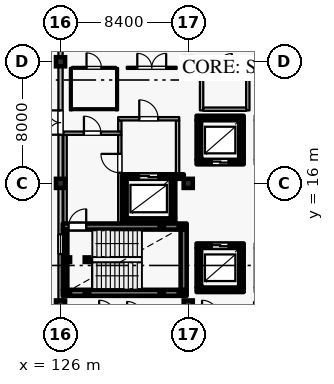
"""IFC4 building model, lengths in metres.
Left out: names, types, materials, properties, quantities, classifications, styles, units other than length and angle.
Written with IfcOpenShell. Run it as: python <this file> out.ifc"""

import sys

from ifc_helpers import new_model, si_unit, direction, frame, frame_2d, origin, origin_2d, place, context, subcontext, project, spatial, rectangle, hollow_rectangle, extrude, element, fill, save


model = new_model("IFC4")
c1 = context("Model", 3, precision=1e-05, world=origin(), true_north=direction((0.0, 1.0)))
c2 = subcontext(c1, "Body", "Model", "MODEL_VIEW")
j1 = project(units=[si_unit("LENGTHUNIT", "METRE"), si_unit("PLANEANGLEUNIT", "RADIAN")], contexts=[c1])
p1 = place(None, origin())
s1 = spatial("IfcSite", under=j1, at=p1, CompositionType="ELEMENT")
p2 = place(p1, origin())
s2 = spatial("IfcBuilding", under=s1, at=p2, CompositionType="ELEMENT")
p3 = place(p2, frame((0.0, 0.0, 43.2)))
s3 = spatial("IfcBuildingStorey", under=s2, at=p3, CompositionType="ELEMENT", Elevation=43.2)
for number, where, z_axis, x_axis in (
    (1, (126.0, 16.0, 0.0), (0.0, 0.0, 1.0), (1.0, 0.0, 0.0)),
    (2, (134.4, 16.0, 0.0), (0.0, 0.0, 1.0), (1.0, 0.0, 0.0)),
    (3, (126.0, 8.0, 0.0), (0.0, 0.0, 1.0), (1.0, 0.0, 0.0)),
    (4, (126.0, 24.0, 0.0), (0.0, 0.0, 1.0), (1.0, 0.0, 0.0)),
    (5, (134.4, 8.0, 0.0), (0.0, 0.0, 1.0), (1.0, 0.0, 0.0)),
    (6, (134.4, 24.0, 0.0), (0.0, 0.0, 1.0), (1.0, 0.0, 0.0)),
):
    element("IfcColumn", number, at=place(p3, frame(where, z_axis=z_axis, x_axis=x_axis)), inside=s3, PredefinedType="COLUMN", context=c2, shape_type="SweptSolid", body=[
        extrude(rectangle(XDim=0.6, YDim=0.6, at=origin_2d()), origin(), (0.0, 0.0, 1.0), 4.2),
    ])
p4 = place(p3, frame((126.0, 8.3, 0.0), z_axis=(0.0, 0.0, 1.0), x_axis=(0.0, 1.0, 0.0)))
e7 = element("IfcWall", 7, at=p4, inside=s3, PredefinedType="SOLIDWALL", context=c2, shape_type="SweptSolid", body=[
    extrude(rectangle(XDim=7.4, YDim=0.28, at=frame_2d((3.7, 0.0))), origin(), (0.0, 0.0, 1.0), 3.3),
])
p5 = place(p4, frame((3.05, 0.0, 0.75)))
e8 = element("IfcOpeningElement", 8, at=p5, cuts=e7, PredefinedType="OPENING", context=c2, shape_type="SweptSolid", body=[
    extrude(rectangle(XDim=1.3, YDim=1.65, at=frame_2d((0.65, 0.825))), frame((0.0, 0.15, 0.0), z_axis=(0.0, -1.0, 0.0), x_axis=(1.0, 0.0, 0.0)), (0.0, 0.0, 1.0), 0.3),
])
p6 = place(p3, frame((126.0, 16.3, 0.0), z_axis=(0.0, 0.0, 1.0), x_axis=(0.0, 1.0, 0.0)))
e9 = element("IfcWall", 9, at=p6, inside=s3, PredefinedType="SOLIDWALL", context=c2, shape_type="SweptSolid", body=[
    extrude(rectangle(XDim=7.4, YDim=0.28, at=frame_2d((3.7, 0.0))), origin(), (0.0, 0.0, 1.0), 3.3),
])
p7 = place(p6, frame((2.9, 0.0, 0.0)))
e10 = element("IfcOpeningElement", 10, at=p7, cuts=e9, PredefinedType="OPENING", context=c2, shape_type="SweptSolid", body=[
    extrude(rectangle(XDim=1.6, YDim=2.25, at=frame_2d((0.8, 1.125))), frame((0.0, 0.15, 0.0), z_axis=(0.0, -1.0, 0.0), x_axis=(1.0, 0.0, 0.0)), (0.0, 0.0, 1.0), 0.3),
])
p8 = place(p3, frame((126.0, 24.3, 0.0), z_axis=(0.0, 0.0, 1.0), x_axis=(0.0, 1.0, 0.0)))
e11 = element("IfcWall", 11, at=p8, inside=s3, PredefinedType="SOLIDWALL", context=c2, shape_type="SweptSolid", body=[
    extrude(rectangle(XDim=7.4, YDim=0.28, at=frame_2d((3.7, 0.0))), origin(), (0.0, 0.0, 1.0), 3.3),
])
p9 = place(p8, frame((3.05, 0.0, 0.75)))
e12 = element("IfcOpeningElement", 12, at=p9, cuts=e11, PredefinedType="OPENING", context=c2, shape_type="SweptSolid", body=[
    extrude(rectangle(XDim=1.3, YDim=1.65, at=frame_2d((0.65, 0.825))), frame((0.0, 0.15, 0.0), z_axis=(0.0, -1.0, 0.0), x_axis=(1.0, 0.0, 0.0)), (0.0, 0.0, 1.0), 0.3),
])
p10 = place(p3, frame((134.95, 17.4, 0.0), z_axis=(0.0, 0.0, 1.0), x_axis=(1.0, 0.0, 0.0)))
e13 = element("IfcWall", 13, at=p10, inside=s3, PredefinedType="SHEAR", context=c2, shape_type="SweptSolid", body=[
    extrude(rectangle(XDim=3.1, YDim=0.3, at=frame_2d((1.55, 0.0))), origin(), (0.0, 0.0, 1.0), 3.935),
])
p11 = place(p10, frame((1.0, 0.0, 0.0)))
e14 = element("IfcOpeningElement", 14, at=p11, cuts=e13, PredefinedType="OPENING", context=c2, shape_type="SweptSolid", body=[
    extrude(rectangle(XDim=1.1, YDim=2.2, at=frame_2d((0.55, 1.1))), frame((0.0, 0.16, 0.0), z_axis=(0.0, -1.0, 0.0), x_axis=(1.0, 0.0, 0.0)), (0.0, 0.0, 1.0), 0.32),
])
p12 = place(p3, frame((137.9, 17.555, 0.0), z_axis=(0.0, 0.0, 1.0), x_axis=(0.0, 1.0, 0.0)))
e15 = element("IfcWall", 15, at=p12, inside=s3, PredefinedType="SHEAR", context=c2, shape_type="SweptSolid", body=[
    extrude(rectangle(XDim=2.59, YDim=0.3, at=frame_2d((1.295, 0.0))), origin(), (0.0, 0.0, 1.0), 3.935),
])
p13 = place(p3, frame((138.05, 20.3, 0.0), z_axis=(0.0, 0.0, 1.0), x_axis=(-1.0, 0.0, 0.0)))
e16 = element("IfcWall", 16, at=p13, inside=s3, PredefinedType="SHEAR", context=c2, shape_type="SweptSolid", body=[
    extrude(rectangle(XDim=3.1, YDim=0.3, at=frame_2d((1.55, 0.0))), origin(), (0.0, 0.0, 1.0), 3.935),
])
p14 = place(p3, frame((135.1, 20.145, 0.0), z_axis=(0.0, 0.0, 1.0), x_axis=(0.0, -1.0, 0.0)))
e17 = element("IfcWall", 17, at=p14, inside=s3, PredefinedType="SHEAR", context=c2, shape_type="SweptSolid", body=[
    extrude(rectangle(XDim=2.59, YDim=0.3, at=frame_2d((1.295, 0.0))), origin(), (0.0, 0.0, 1.0), 3.935),
])
p15 = place(p3, frame((134.95, 9.0, 0.0), z_axis=(0.0, 0.0, 1.0), x_axis=(1.0, 0.0, 0.0)))
e18 = element("IfcWall", 18, at=p15, inside=s3, PredefinedType="SHEAR", context=c2, shape_type="SweptSolid", body=[
    extrude(rectangle(XDim=3.1, YDim=0.3, at=frame_2d((1.55, 0.0))), origin(), (0.0, 0.0, 1.0), 3.935),
])
p16 = place(p3, frame((137.9, 9.155, 0.0), z_axis=(0.0, 0.0, 1.0), x_axis=(0.0, 1.0, 0.0)))
e19 = element("IfcWall", 19, at=p16, inside=s3, PredefinedType="SHEAR", context=c2, shape_type="SweptSolid", body=[
    extrude(rectangle(XDim=2.59, YDim=0.3, at=frame_2d((1.295, 0.0))), origin(), (0.0, 0.0, 1.0), 3.935),
])
p17 = place(p3, frame((138.05, 11.9, 0.0), z_axis=(0.0, 0.0, 1.0), x_axis=(-1.0, 0.0, 0.0)))
e20 = element("IfcWall", 20, at=p17, inside=s3, PredefinedType="SHEAR", context=c2, shape_type="SweptSolid", body=[
    extrude(rectangle(XDim=3.1, YDim=0.3, at=frame_2d((1.55, 0.0))), origin(), (0.0, 0.0, 1.0), 3.935),
])
p18 = place(p17, frame((1.0, 0.0, 0.0)))
e21 = element("IfcOpeningElement", 21, at=p18, cuts=e20, PredefinedType="OPENING", context=c2, shape_type="SweptSolid", body=[
    extrude(rectangle(XDim=1.1, YDim=2.2, at=frame_2d((0.55, 1.1))), frame((0.0, 0.16, 0.0), z_axis=(0.0, -1.0, 0.0), x_axis=(1.0, 0.0, 0.0)), (0.0, 0.0, 1.0), 0.32),
])
p19 = place(p3, frame((135.1, 11.745, 0.0), z_axis=(0.0, 0.0, 1.0), x_axis=(0.0, -1.0, 0.0)))
e22 = element("IfcWall", 22, at=p19, inside=s3, PredefinedType="SHEAR", context=c2, shape_type="SweptSolid", body=[
    extrude(rectangle(XDim=2.59, YDim=0.3, at=frame_2d((1.295, 0.0))), origin(), (0.0, 0.0, 1.0), 3.935),
])
p20 = place(p3, frame((130.05, 13.55, 0.0), z_axis=(0.0, 0.0, 1.0), x_axis=(1.0, 0.0, 0.0)))
e23 = element("IfcWall", 23, at=p20, inside=s3, PredefinedType="SHEAR", context=c2, shape_type="SweptSolid", body=[
    extrude(rectangle(XDim=3.5, YDim=0.3, at=frame_2d((1.75, 0.0))), origin(), (0.0, 0.0, 1.0), 3.935),
])
p21 = place(p3, frame((133.4, 13.705, 0.0), z_axis=(0.0, 0.0, 1.0), x_axis=(0.0, 1.0, 0.0)))
e24 = element("IfcWall", 24, at=p21, inside=s3, PredefinedType="SHEAR", context=c2, shape_type="SweptSolid", body=[
    extrude(rectangle(XDim=2.59, YDim=0.3, at=frame_2d((1.295, 0.0))), origin(), (0.0, 0.0, 1.0), 3.935),
])
p22 = place(p3, frame((134.11, 16.45, 0.0), z_axis=(0.0, 0.0, 1.0), x_axis=(-1.0, 0.0, 0.0)))
e25 = element("IfcWall", 25, at=p22, inside=s3, PredefinedType="SHEAR", context=c2, shape_type="SweptSolid", body=[
    extrude(rectangle(XDim=4.06, YDim=0.3, at=frame_2d((2.03, 0.0))), origin(), (0.0, 0.0, 1.0), 3.935),
])
p23 = place(p22, frame((1.685, 0.0, 0.0)))
e26 = element("IfcOpeningElement", 26, at=p23, cuts=e25, PredefinedType="OPENING", context=c2, shape_type="SweptSolid", body=[
    extrude(rectangle(XDim=1.25, YDim=2.25, at=frame_2d((0.625, 1.125))), frame((0.0, 0.16, 0.0), z_axis=(0.0, -1.0, 0.0), x_axis=(1.0, 0.0, 0.0)), (0.0, 0.0, 1.0), 0.32),
])
p24 = place(p3, frame((130.2, 16.295, 0.0), z_axis=(0.0, 0.0, 1.0), x_axis=(0.0, -1.0, 0.0)))
e27 = element("IfcWall", 27, at=p24, inside=s3, PredefinedType="SHEAR", context=c2, shape_type="SweptSolid", body=[
    extrude(rectangle(XDim=2.59, YDim=0.3, at=frame_2d((1.295, 0.0))), origin(), (0.0, 0.0, 1.0), 3.935),
])
p25 = place(p3, frame((126.15, 8.8, 0.0), z_axis=(0.0, 0.0, 1.0), x_axis=(1.0, 0.0, 0.0)))
e28 = element("IfcWall", 28, at=p25, inside=s3, PredefinedType="SHEAR", context=c2, shape_type="SweptSolid", body=[
    extrude(rectangle(XDim=8.15, YDim=0.4, at=frame_2d((4.075, 0.0))), origin(), (0.0, 0.0, 1.0), 3.935),
])
p26 = place(p3, frame((134.1, 9.005, 0.0), z_axis=(0.0, 0.0, 1.0), x_axis=(0.0, 1.0, 0.0)))
e29 = element("IfcWall", 29, at=p26, inside=s3, PredefinedType="SHEAR", context=c2, shape_type="SweptSolid", body=[
    extrude(rectangle(XDim=3.95, YDim=0.4, at=frame_2d((1.975, 0.0))), origin(), (0.0, 0.0, 1.0), 3.935),
])
p27 = place(p3, frame((126.15, 13.16, 0.0), z_axis=(0.0, 0.0, 1.0), x_axis=(1.0, 0.0, 0.0)))
e30 = element("IfcWall", 30, at=p27, inside=s3, PredefinedType="SHEAR", context=c2, shape_type="SweptSolid", body=[
    extrude(rectangle(XDim=8.15, YDim=0.4, at=frame_2d((4.075, 0.0))), origin(), (0.0, 0.0, 1.0), 3.935),
])
p28 = place(p27, frame((0.38, 0.0, 0.0)))
e31 = element("IfcOpeningElement", 31, at=p28, cuts=e30, PredefinedType="OPENING", context=c2, shape_type="SweptSolid", body=[
    extrude(rectangle(XDim=1.16, YDim=2.2, at=frame_2d((0.58, 1.1))), frame((0.0, 0.21, 0.0), z_axis=(0.0, -1.0, 0.0), x_axis=(1.0, 0.0, 0.0)), (0.0, 0.0, 1.0), 0.42),
])
p29 = place(p3, frame((126.3, 9.005, 0.0), z_axis=(0.0, 0.0, 1.0), x_axis=(0.0, 1.0, 0.0)))
e32 = element("IfcWall", 32, at=p29, inside=s3, PredefinedType="SHEAR", context=c2, shape_type="SweptSolid", body=[
    extrude(rectangle(XDim=3.95, YDim=0.3, at=frame_2d((1.975, 0.0))), origin(), (0.0, 0.0, 1.0), 3.935),
])
p30 = place(p3, frame((126.3, 13.365, 0.0), z_axis=(0.0, 0.0, 1.0), x_axis=(0.0, 1.0, 0.0)))
e33 = element("IfcWall", 33, at=p30, inside=s3, PredefinedType="PARTITIONING", context=c2, shape_type="SweptSolid", body=[
    extrude(rectangle(XDim=5.82, YDim=0.22, at=frame_2d((2.91, 0.0))), origin(), (0.0, 0.0, 1.0), 3.935),
])
p31 = place(p3, frame((126.19, 19.3, 0.0), z_axis=(0.0, 0.0, 1.0), x_axis=(1.0, 0.0, 0.0)))
e34 = element("IfcWall", 34, at=p31, inside=s3, PredefinedType="PARTITIONING", context=c2, shape_type="SweptSolid", body=[
    extrude(rectangle(XDim=3.82, YDim=0.22, at=frame_2d((1.91, 0.0))), origin(), (0.0, 0.0, 1.0), 3.935),
])
p32 = place(p31, frame((1.35, 0.0, 0.0)))
e35 = element("IfcOpeningElement", 35, at=p32, cuts=e34, PredefinedType="OPENING", context=c2, shape_type="SweptSolid", body=[
    extrude(rectangle(XDim=1.12, YDim=2.2, at=frame_2d((0.56, 1.1))), frame((0.0, 0.12, 0.0), z_axis=(0.0, -1.0, 0.0), x_axis=(1.0, 0.0, 0.0)), (0.0, 0.0, 1.0), 0.24),
])
p33 = place(p3, frame((129.9, 13.365, 0.0), z_axis=(0.0, 0.0, 1.0), x_axis=(0.0, 1.0, 0.0)))
e36 = element("IfcWall", 36, at=p33, inside=s3, PredefinedType="PARTITIONING", context=c2, shape_type="SweptSolid", body=[
    extrude(rectangle(XDim=5.82, YDim=0.22, at=frame_2d((2.91, 0.0))), origin(), (0.0, 0.0, 1.0), 3.935),
])
p34 = place(p33, frame((3.335, 0.0, 0.0)))
e37 = element("IfcOpeningElement", 37, at=p34, cuts=e36, PredefinedType="OPENING", context=c2, shape_type="SweptSolid", body=[
    extrude(rectangle(XDim=1.24, YDim=2.2, at=frame_2d((0.62, 1.1))), frame((0.0, 0.12, 0.0), z_axis=(0.0, -1.0, 0.0), x_axis=(1.0, 0.0, 0.0)), (0.0, 0.0, 1.0), 0.24),
])
p35 = place(p3, frame((129.9, 19.415, 0.0), z_axis=(0.0, 0.0, 1.0), x_axis=(0.0, 1.0, 0.0)))
e38 = element("IfcWall", 38, at=p35, inside=s3, PredefinedType="PARTITIONING", context=c2, shape_type="SweptSolid", body=[
    extrude(rectangle(XDim=0.72, YDim=0.22, at=frame_2d((0.36, 0.0))), origin(), (0.0, 0.0, 1.0), 3.935),
])
p36 = place(p3, frame((133.7, 16.605, 0.0), z_axis=(0.0, 0.0, 1.0), x_axis=(0.0, 1.0, 0.0)))
e39 = element("IfcWall", 39, at=p36, inside=s3, PredefinedType="PARTITIONING", context=c2, shape_type="SweptSolid", body=[
    extrude(rectangle(XDim=3.53, YDim=0.22, at=frame_2d((1.765, 0.0))), origin(), (0.0, 0.0, 1.0), 3.935),
])
p37 = place(p3, frame((129.79, 20.25, 0.0), z_axis=(0.0, 0.0, 1.0), x_axis=(1.0, 0.0, 0.0)))
e40 = element("IfcWall", 40, at=p37, inside=s3, PredefinedType="PARTITIONING", context=c2, shape_type="SweptSolid", body=[
    extrude(rectangle(XDim=4.02, YDim=0.22, at=frame_2d((2.01, 0.0))), origin(), (0.0, 0.0, 1.0), 3.935),
])
p38 = place(p37, frame((1.39, 0.0, 0.0)))
e41 = element("IfcOpeningElement", 41, at=p38, cuts=e40, PredefinedType="OPENING", context=c2, shape_type="SweptSolid", body=[
    extrude(rectangle(XDim=1.24, YDim=2.2, at=frame_2d((0.62, 1.1))), frame((0.0, 0.12, 0.0), z_axis=(0.0, -1.0, 0.0), x_axis=(1.0, 0.0, 0.0)), (0.0, 0.0, 1.0), 0.24),
])
for number, where, z_axis, x_axis in (
    (42, (126.48, 8.8, 0.0), (0.0, 0.0, 1.0), (1.0, 0.0, 0.0)),
    (43, (126.48, 10.98, 0.0), (0.0, 0.0, 1.0), (1.0, 0.0, 0.0)),
    (44, (127.74, 8.8, 0.0), (0.0, 0.0, 1.0), (1.0, 0.0, 0.0)),
    (45, (127.74, 10.98, 0.0), (0.0, 0.0, 1.0), (1.0, 0.0, 0.0)),
):
    element("IfcColumn", number, at=place(p3, frame(where, z_axis=z_axis, x_axis=x_axis)), inside=s3, PredefinedType="COLUMN", context=c2, shape_type="SweptSolid", body=[
        extrude(hollow_rectangle(XDim=0.3, YDim=0.3, WallThickness=0.012, at=origin_2d()), origin(), (0.0, 0.0, 1.0), 4.02),
    ])
for number, where, z_axis, x_axis in (
    (46, (132.66, 8.8, -1.8), (0.0, 0.0, 1.0), (1.0, 0.0, 0.0)),
    (47, (132.66, 13.16, -1.8), (0.0, 0.0, 1.0), (1.0, 0.0, 0.0)),
    (48, (133.92, 8.8, -1.8), (0.0, 0.0, 1.0), (1.0, 0.0, 0.0)),
    (49, (133.92, 13.16, -1.8), (0.0, 0.0, 1.0), (1.0, 0.0, 0.0)),
):
    element("IfcColumn", number, at=place(p3, frame(where, z_axis=z_axis, x_axis=x_axis)), inside=s3, PredefinedType="COLUMN", context=c2, shape_type="SweptSolid", body=[
        extrude(hollow_rectangle(XDim=0.3, YDim=0.3, WallThickness=0.012, at=origin_2d()), origin(), (0.0, 0.0, 1.0), 3.72),
    ])
p39 = place(p3, frame((130.36, 23.6, 0.0), z_axis=(0.0, 0.0, 1.0), x_axis=(1.0, 0.0, 0.0)))
e50 = element("IfcWall", 50, at=p39, inside=s3, PredefinedType="PARTITIONING", context=c2, shape_type="SweptSolid", body=[
    extrude(rectangle(XDim=3.28, YDim=0.14, at=frame_2d((1.64, 0.0))), origin(), (0.0, 0.0, 1.0), 3.935),
])
p40 = place(p39, frame((0.69, 0.0, 0.0)))
e51 = element("IfcOpeningElement", 51, at=p40, cuts=e50, PredefinedType="OPENING", context=c2, shape_type="SweptSolid", body=[
    extrude(rectangle(XDim=1.9, YDim=2.4, at=frame_2d((0.95, 1.2))), frame((0.0, 0.08, 0.0), z_axis=(0.0, -1.0, 0.0), x_axis=(1.0, 0.0, 0.0)), (0.0, 0.0, 1.0), 0.16),
])
p41 = place(p3, frame((135.36, 23.6, 0.0), z_axis=(0.0, 0.0, 1.0), x_axis=(1.0, 0.0, 0.0)))
e52 = element("IfcWall", 52, at=p41, inside=s3, PredefinedType="PARTITIONING", context=c2, shape_type="SweptSolid", body=[
    extrude(rectangle(XDim=2.88, YDim=0.22, at=frame_2d((1.44, 0.0))), origin(), (0.0, 0.0, 1.0), 3.935),
])
p42 = place(p41, frame((0.97, 0.0, 0.0)))
e53 = element("IfcOpeningElement", 53, at=p42, cuts=e52, PredefinedType="OPENING", context=c2, shape_type="SweptSolid", body=[
    extrude(rectangle(XDim=0.94, YDim=2.15, at=frame_2d((0.47, 1.075))), frame((0.0, 0.12, 0.0), z_axis=(0.0, -1.0, 0.0), x_axis=(1.0, 0.0, 0.0)), (0.0, 0.0, 1.0), 0.24),
])
p43 = place(p3, frame((126.76, 23.6, 0.0), z_axis=(0.0, 0.0, 1.0), x_axis=(1.0, 0.0, 0.0)))
e54 = element("IfcWall", 54, at=p43, inside=s3, PredefinedType="PARTITIONING", context=c2, shape_type="SweptSolid", body=[
    extrude(rectangle(XDim=2.88, YDim=0.125, at=frame_2d((1.44, 0.0))), origin(), (0.0, 0.0, 1.0), 3.935),
])
p44 = place(p43, frame((0.95, 0.0, 0.0)))
e55 = element("IfcOpeningElement", 55, at=p44, cuts=e54, PredefinedType="OPENING", context=c2, shape_type="SweptSolid", body=[
    extrude(rectangle(XDim=0.98, YDim=2.15, at=frame_2d((0.49, 1.075))), frame((0.0, 0.073, 0.0), z_axis=(0.0, -1.0, 0.0), x_axis=(1.0, 0.0, 0.0)), (0.0, 0.0, 1.0), 0.145),
])
for number, where, z_axis, x_axis in (
    (56, (135.28, 20.8, 0.0), (0.0, 0.0, 1.0), (0.0, 1.0, 0.0)),
    (57, (138.32, 20.8, 0.0), (0.0, 0.0, 1.0), (0.0, 1.0, 0.0)),
):
    element("IfcWall", number, at=place(p3, frame(where, z_axis=z_axis, x_axis=x_axis)), inside=s3, PredefinedType="PARTITIONING", context=c2, shape_type="SweptSolid", body=[
        extrude(rectangle(XDim=2.748, YDim=0.22, at=frame_2d((1.374, 0.0))), origin(), (0.0, 0.0, 1.0), 3.935),
    ])
p45 = place(p3, frame((135.39, 20.88, 0.0), z_axis=(0.0, 0.0, 1.0), x_axis=(1.0, 0.0, 0.0)))
e58 = element("IfcWall", 58, at=p45, inside=s3, PredefinedType="PARTITIONING", context=c2, shape_type="SweptSolid", body=[
    extrude(rectangle(XDim=2.82, YDim=0.22, at=frame_2d((1.41, 0.0))), origin(), (0.0, 0.0, 1.0), 3.935),
])
for number, where, z_axis, x_axis in (
    (59, (126.68, 20.8, 0.0), (0.0, 0.0, 1.0), (0.0, 1.0, 0.0)),
    (60, (129.72, 20.8, 0.0), (0.0, 0.0, 1.0), (0.0, 1.0, 0.0)),
):
    element("IfcWall", number, at=place(p3, frame(where, z_axis=z_axis, x_axis=x_axis)), inside=s3, PredefinedType="PARTITIONING", context=c2, shape_type="SweptSolid", body=[
        extrude(rectangle(XDim=2.796, YDim=0.125, at=frame_2d((1.398, 0.0))), origin(), (0.0, 0.0, 1.0), 3.935),
    ])
p46 = place(p3, frame((126.742, 20.88, 0.0), z_axis=(0.0, 0.0, 1.0), x_axis=(1.0, 0.0, 0.0)))
e61 = element("IfcWall", 61, at=p46, inside=s3, PredefinedType="PARTITIONING", context=c2, shape_type="SweptSolid", body=[
    extrude(rectangle(XDim=2.915, YDim=0.125, at=frame_2d((1.458, 0.0))), origin(), (0.0, 0.0, 1.0), 3.935),
])
p47 = place(p5, origin())
e62 = element("IfcWindow", 62, at=p47, inside=s3, PartitioningType="SINGLE_PANEL", PredefinedType="WINDOW", context=c2, shape_type="SweptSolid", body=[
    extrude(rectangle(XDim=1.3, YDim=1.65, at=frame_2d((0.65, 0.825))), frame((0.0, 0.03, 0.0), z_axis=(0.0, -1.0, 0.0), x_axis=(1.0, 0.0, 0.0)), (0.0, 0.0, 1.0), 0.06),
])
fill(e8, e62)
p48 = place(p7, origin())
e63 = element("IfcDoor", 63, at=p48, inside=s3, OperationType="DOUBLE_DOOR_SINGLE_SWING", PredefinedType="DOOR", context=c2, shape_type="SweptSolid", body=[
    extrude(rectangle(XDim=1.6, YDim=2.25, at=frame_2d((0.8, 1.125))), frame((0.0, 0.025, 0.0), z_axis=(0.0, -1.0, 0.0), x_axis=(1.0, 0.0, 0.0)), (0.0, 0.0, 1.0), 0.05),
])
fill(e10, e63)
p49 = place(p11, origin())
e64 = element("IfcDoor", 64, at=p49, inside=s3, OperationType="DOUBLE_DOOR_SLIDING", PredefinedType="DOOR", context=c2, shape_type="SweptSolid", body=[
    extrude(rectangle(XDim=1.1, YDim=2.2, at=frame_2d((0.55, 1.1))), frame((0.0, 0.025, 0.0), z_axis=(0.0, -1.0, 0.0), x_axis=(1.0, 0.0, 0.0)), (0.0, 0.0, 1.0), 0.05),
])
fill(e14, e64)
p50 = place(p18, origin())
e65 = element("IfcDoor", 65, at=p50, inside=s3, OperationType="DOUBLE_DOOR_SLIDING", PredefinedType="DOOR", context=c2, shape_type="SweptSolid", body=[
    extrude(rectangle(XDim=1.1, YDim=2.2, at=frame_2d((0.55, 1.1))), frame((0.0, 0.025, 0.0), z_axis=(0.0, -1.0, 0.0), x_axis=(1.0, 0.0, 0.0)), (0.0, 0.0, 1.0), 0.05),
])
fill(e21, e65)
p51 = place(p23, origin())
e66 = element("IfcDoor", 66, at=p51, inside=s3, OperationType="DOUBLE_DOOR_SLIDING", PredefinedType="DOOR", context=c2, shape_type="SweptSolid", body=[
    extrude(rectangle(XDim=1.25, YDim=2.25, at=frame_2d((0.625, 1.125))), frame((0.0, 0.025, 0.0), z_axis=(0.0, -1.0, 0.0), x_axis=(1.0, 0.0, 0.0)), (0.0, 0.0, 1.0), 0.05),
])
fill(e26, e66)
p52 = place(p28, origin())
e67 = element("IfcDoor", 67, at=p52, inside=s3, OperationType="SINGLE_SWING_RIGHT", PredefinedType="DOOR", context=c2, shape_type="SweptSolid", body=[
    extrude(rectangle(XDim=1.16, YDim=2.2, at=frame_2d((0.58, 1.1))), frame((0.0, 0.025, 0.0), z_axis=(0.0, -1.0, 0.0), x_axis=(1.0, 0.0, 0.0)), (0.0, 0.0, 1.0), 0.05),
])
fill(e31, e67)
p53 = place(p32, origin())
e68 = element("IfcDoor", 68, at=p53, inside=s3, OperationType="SINGLE_SWING_LEFT", PredefinedType="DOOR", context=c2, shape_type="SweptSolid", body=[
    extrude(rectangle(XDim=1.12, YDim=2.2, at=frame_2d((0.56, 1.1))), frame((0.0, 0.025, 0.0), z_axis=(0.0, -1.0, 0.0), x_axis=(1.0, 0.0, 0.0)), (0.0, 0.0, 1.0), 0.05),
])
fill(e35, e68)
p54 = place(p34, origin())
e69 = element("IfcDoor", 69, at=p54, inside=s3, OperationType="SINGLE_SWING_RIGHT", PredefinedType="DOOR", context=c2, shape_type="SweptSolid", body=[
    extrude(rectangle(XDim=1.24, YDim=2.2, at=frame_2d((0.62, 1.1))), frame((0.0, 0.025, 0.0), z_axis=(0.0, -1.0, 0.0), x_axis=(1.0, 0.0, 0.0)), (0.0, 0.0, 1.0), 0.05),
])
fill(e37, e69)
p55 = place(p38, origin())
e70 = element("IfcDoor", 70, at=p55, inside=s3, OperationType="SINGLE_SWING_LEFT", PredefinedType="DOOR", context=c2, shape_type="SweptSolid", body=[
    extrude(rectangle(XDim=1.24, YDim=2.2, at=frame_2d((0.62, 1.1))), frame((0.0, 0.025, 0.0), z_axis=(0.0, -1.0, 0.0), x_axis=(1.0, 0.0, 0.0)), (0.0, 0.0, 1.0), 0.05),
])
fill(e41, e70)
p56 = place(p40, origin())
e71 = element("IfcDoor", 71, at=p56, inside=s3, OperationType="DOUBLE_DOOR_SINGLE_SWING", PredefinedType="DOOR", context=c2, shape_type="SweptSolid", body=[
    extrude(rectangle(XDim=1.9, YDim=2.4, at=frame_2d((0.95, 1.2))), frame((0.0, 0.025, 0.0), z_axis=(0.0, -1.0, 0.0), x_axis=(1.0, 0.0, 0.0)), (0.0, 0.0, 1.0), 0.05),
])
fill(e51, e71)
p57 = place(p42, origin())
e72 = element("IfcDoor", 72, at=p57, inside=s3, OperationType="SINGLE_SWING_RIGHT", PredefinedType="DOOR", context=c2, shape_type="SweptSolid", body=[
    extrude(rectangle(XDim=0.94, YDim=2.15, at=frame_2d((0.47, 1.075))), frame((0.0, 0.025, 0.0), z_axis=(0.0, -1.0, 0.0), x_axis=(1.0, 0.0, 0.0)), (0.0, 0.0, 1.0), 0.05),
])
fill(e53, e72)
p58 = place(p44, origin())
e73 = element("IfcDoor", 73, at=p58, inside=s3, OperationType="SINGLE_SWING_LEFT", PredefinedType="DOOR", context=c2, shape_type="SweptSolid", body=[
    extrude(rectangle(XDim=0.98, YDim=2.15, at=frame_2d((0.49, 1.075))), frame((0.0, 0.025, 0.0), z_axis=(0.0, -1.0, 0.0), x_axis=(1.0, 0.0, 0.0)), (0.0, 0.0, 1.0), 0.05),
])
fill(e55, e73)
save(model, sys.argv[1])
